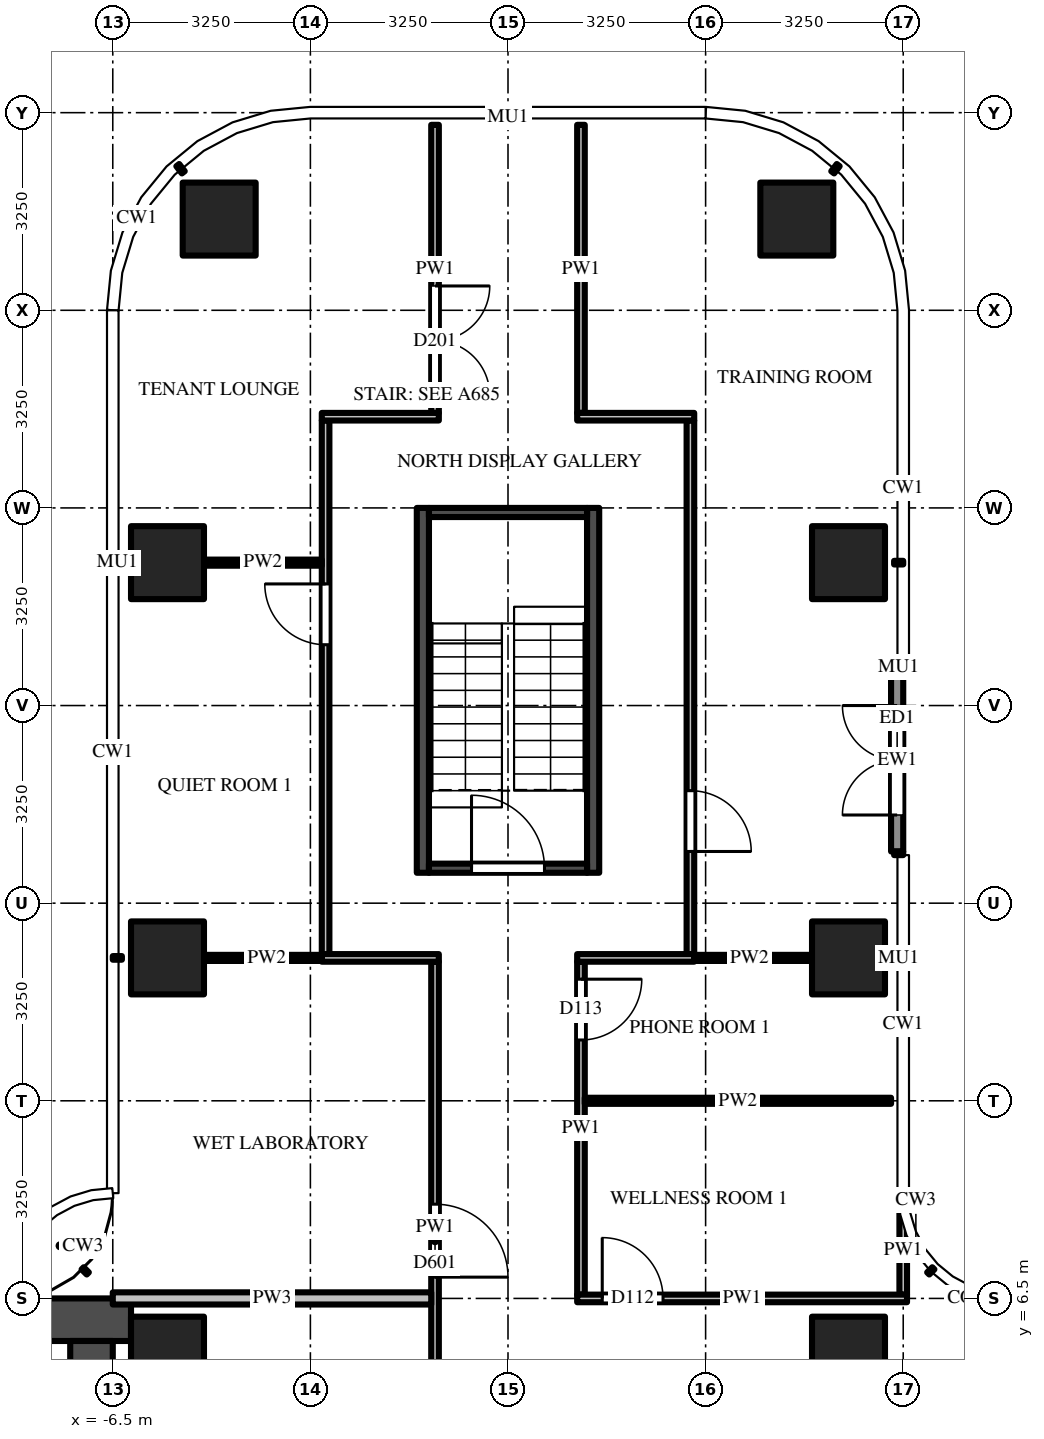
"""IFC4 building model, lengths in metres.
Left out: names, types, materials, properties, quantities, classifications, styles, units other than length and angle.
Written with IfcOpenShell. Run it as: python <this file> out.ifc"""

import sys

from ifc_helpers import new_model, si_unit, direction, frame, frame_2d, origin, origin_2d, place, context, subcontext, project, spatial, rectangle, extrude, source, transform, mapped, element, fill, save


model = new_model("IFC4")
c1 = context("Model", 3, precision=1e-05, world=origin(), true_north=direction((0.0, 1.0)))
c2 = subcontext(c1, "Body", "Model", "MODEL_VIEW")
j1 = project(units=[si_unit("LENGTHUNIT", "METRE"), si_unit("PLANEANGLEUNIT", "RADIAN")], contexts=[c1])
p1 = place(None, origin())
s1 = spatial("IfcSite", under=j1, at=p1, CompositionType="ELEMENT")
p2 = place(p1, origin())
s2 = spatial("IfcBuilding", under=s1, at=p2, CompositionType="ELEMENT")
p3 = place(p2, frame((0.0, 0.0, 173.7)))
s3 = spatial("IfcBuildingStorey", under=s2, at=p3, CompositionType="ELEMENT", Elevation=173.7)
m1 = source(origin(), c2, "Body", "SweptSolid", [
    extrude(rectangle(XDim=1.2, YDim=1.2, at=origin_2d()), origin(), (0.0, 0.0, 1.0), 3.9),
])
for number, where, z_axis, x_axis in (
    (1, (-5.6, 12.1, 0.0), (0.0, 0.0, 1.0), (1.0, 0.0, 0.0)),
    (2, (-5.6, 18.6, 0.0), (0.0, 0.0, 1.0), (1.0, 0.0, 0.0)),
    (3, (-4.75, 24.25, 0.0), (0.0, 0.0, 1.0), (1.0, 0.0, 0.0)),
    (4, (5.6, 12.1, 0.0), (0.0, 0.0, 1.0), (1.0, 0.0, 0.0)),
    (5, (5.6, 18.6, 0.0), (0.0, 0.0, 1.0), (1.0, 0.0, 0.0)),
    (6, (4.75, 24.25, 0.0), (0.0, 0.0, 1.0), (1.0, 0.0, 0.0)),
    (7, (5.6, 5.6, 0.0), (0.0, 0.0, 1.0), (1.0, 0.0, 0.0)),
    (8, (-5.6, 5.6, 0.0), (0.0, 0.0, 1.0), (1.0, 0.0, 0.0)),
):
    element("IfcColumn", number, at=place(p3, frame(where, z_axis=z_axis, x_axis=x_axis)), inside=s3, PredefinedType="COLUMN", context=c2, shape_type="MappedRepresentation", body=[
        mapped(m1, transform((0.0, 0.0, 0.0))),
    ])
m2 = source(origin(), c2, "Body", "SweptSolid", [
    extrude(rectangle(XDim=16.55, YDim=0.7, at=frame_2d((8.275, 0.0))), origin(), (0.0, 0.0, 1.0), 3.7),
])
p4 = place(p3, frame((-6.2, 6.15, 0.0), z_axis=(0.0, 0.0, 1.0), x_axis=(-1.0, 0.0, 0.0)))
e9 = element("IfcWall", 9, at=p4, inside=s3, PredefinedType="SHEAR", context=c2, shape_type="MappedRepresentation", body=[
    mapped(m2, transform((0.0, 0.0, 0.0))),
])
m3 = source(origin(), c2, "Body", "SweptSolid", [
    extrude(rectangle(XDim=9.05, YDim=0.7, at=frame_2d((4.525, 0.0))), origin(), (0.0, 0.0, 1.0), 3.7),
])
p5 = place(p3, frame((-6.85, 5.8, 0.0), z_axis=(0.0, 0.0, 1.0), x_axis=(0.0, -1.0, 0.0)))
e10 = element("IfcWall", 10, at=p5, inside=s3, PredefinedType="SHEAR", context=c2, shape_type="MappedRepresentation", body=[
    mapped(m3, transform((0.0, 0.0, 0.0))),
])
m4 = source(origin(), c2, "Body", "SweptSolid", [
    extrude(rectangle(XDim=1.8, YDim=2.1, at=frame_2d((0.9, 1.05))), frame((0.0, 0.36, 0.0), z_axis=(0.0, -1.0, 0.0), x_axis=(1.0, 0.0, 0.0)), (0.0, 0.0, 1.0), 0.72),
])
p6 = place(p5, frame((3.15, 0.0, 0.0)))
e11 = element("IfcOpeningElement", 11, at=p6, cuts=e10, PredefinedType="OPENING", context=c2, shape_type="MappedRepresentation", body=[
    mapped(m4, transform((0.0, 0.0, 0.0))),
])
m5 = source(origin(), c2, "Body", "SweptSolid", [
    extrude(rectangle(XDim=6.0, YDim=0.2, at=frame_2d((3.0, 0.0))), origin(), (0.0, 0.0, 1.0), 3.7),
])
for number, where, z_axis, x_axis in (
    (12, (-1.4, 13.5, 0.0), (0.0, 0.0, 1.0), (0.0, 1.0, 0.0)),
    (13, (1.4, 13.5, 0.0), (0.0, 0.0, 1.0), (0.0, 1.0, 0.0)),
):
    element("IfcWall", number, at=place(p3, frame(where, z_axis=z_axis, x_axis=x_axis)), inside=s3, PredefinedType="SHEAR", context=c2, shape_type="MappedRepresentation", body=[
        mapped(m5, transform((0.0, 0.0, 0.0))),
    ])
m6 = source(origin(), c2, "Body", "SweptSolid", [
    extrude(rectangle(XDim=2.6, YDim=0.15, at=frame_2d((1.3, 0.0))), origin(), (0.0, 0.0, 1.0), 3.7),
])
p7 = place(p3, frame((-1.3, 13.575, 0.0), z_axis=(0.0, 0.0, 1.0), x_axis=(1.0, 0.0, 0.0)))
e14 = element("IfcWall", 14, at=p7, inside=s3, PredefinedType="SHEAR", context=c2, shape_type="MappedRepresentation", body=[
    mapped(m6, transform((0.0, 0.0, 0.0))),
])
m7 = source(origin(), c2, "Body", "SweptSolid", [
    extrude(rectangle(XDim=1.2, YDim=2.1, at=frame_2d((0.6, 1.05))), frame((0.0, 0.085, 0.0), z_axis=(0.0, -1.0, 0.0), x_axis=(1.0, 0.0, 0.0)), (0.0, 0.0, 1.0), 0.17),
])
p8 = place(p7, frame((0.7, 0.0, 0.0)))
e15 = element("IfcOpeningElement", 15, at=p8, cuts=e14, PredefinedType="OPENING", context=c2, shape_type="MappedRepresentation", body=[
    mapped(m7, transform((0.0, 0.0, 0.0))),
])
p9 = place(p3, frame((-1.3, 19.425, 0.0), z_axis=(0.0, 0.0, 1.0), x_axis=(1.0, 0.0, 0.0)))
e16 = element("IfcWall", 16, at=p9, inside=s3, PredefinedType="SHEAR", context=c2, shape_type="MappedRepresentation", body=[
    mapped(m6, transform((0.0, 0.0, 0.0))),
])
m8 = source(origin(), c2, "Body", "SweptSolid", [
    extrude(rectangle(XDim=3.0, YDim=0.2, at=frame_2d((1.5, 0.0))), origin(), (0.0, 0.0, 1.0), 3.7),
])
p10 = place(p3, frame((6.4, 13.85, 0.0), z_axis=(0.0, 0.0, 1.0), x_axis=(0.0, 1.0, 0.0)))
e17 = element("IfcWall", 17, at=p10, inside=s3, PredefinedType="SOLIDWALL", context=c2, shape_type="MappedRepresentation", body=[
    mapped(m8, transform((0.0, 0.0, 0.0))),
])
m9 = source(origin(), c2, "Body", "SweptSolid", [
    extrude(rectangle(XDim=1.8, YDim=2.4, at=frame_2d((0.9, 1.2))), frame((0.0, 0.11, 0.0), z_axis=(0.0, -1.0, 0.0), x_axis=(1.0, 0.0, 0.0)), (0.0, 0.0, 1.0), 0.22),
])
p11 = place(p10, frame((0.6, 0.0, 0.0)))
e18 = element("IfcOpeningElement", 18, at=p11, cuts=e17, PredefinedType="OPENING", context=c2, shape_type="MappedRepresentation", body=[
    mapped(m9, transform((0.0, 0.0, 0.0))),
])
m10 = source(origin(), c2, "Body", "SweptSolid", [
    extrude(rectangle(XDim=8.788, YDim=0.125, at=frame_2d((4.394, 0.0))), origin(), (0.0, 0.0, 1.0), 2.997),
])
p12 = place(p3, frame((-3.0, 12.15, 0.0), z_axis=(0.0, 0.0, 1.0), x_axis=(0.0, 1.0, 0.0)))
e19 = element("IfcWall", 19, at=p12, inside=s3, PredefinedType="PARTITIONING", context=c2, shape_type="MappedRepresentation", body=[
    mapped(m10, transform((0.0, 0.0, 0.0))),
])
m11 = source(origin(), c2, "Body", "SweptSolid", [
    extrude(rectangle(XDim=1.0, YDim=2.1, at=frame_2d((0.5, 1.05))), frame((0.0, 0.073, 0.0), z_axis=(0.0, -1.0, 0.0), x_axis=(1.0, 0.0, 0.0)), (0.0, 0.0, 1.0), 0.145),
])
p13 = place(p12, frame((5.1, 0.0, 0.0)))
e20 = element("IfcOpeningElement", 20, at=p13, cuts=e19, PredefinedType="OPENING", context=c2, shape_type="MappedRepresentation", body=[
    mapped(m11, transform((0.0, 0.0, 0.0))),
])
m12 = source(origin(), c2, "Body", "SweptSolid", [
    extrude(rectangle(XDim=8.725, YDim=0.125, at=frame_2d((4.363, 0.0))), origin(), (0.0, 0.0, 1.0), 2.997),
])
p14 = place(p3, frame((-1.2, 12.038, 0.0), z_axis=(0.0, 0.0, 1.0), x_axis=(0.0, -1.0, 0.0)))
e21 = element("IfcWall", 21, at=p14, inside=s3, PredefinedType="PARTITIONING", context=c2, shape_type="MappedRepresentation", body=[
    mapped(m12, transform((0.0, 0.0, 0.0))),
])
m13 = source(origin(), c2, "Body", "SweptSolid", [
    extrude(rectangle(XDim=1.2, YDim=2.1, at=frame_2d((0.6, 1.05))), frame((0.0, 0.073, 0.0), z_axis=(0.0, -1.0, 0.0), x_axis=(1.0, 0.0, 0.0)), (0.0, 0.0, 1.0), 0.145),
])
p15 = place(p14, frame((3.988, 0.0, 0.0)))
e22 = element("IfcOpeningElement", 22, at=p15, cuts=e21, PredefinedType="OPENING", context=c2, shape_type="MappedRepresentation", body=[
    mapped(m13, transform((0.0, 0.0, 0.0))),
])
m14 = source(origin(), c2, "Body", "SweptSolid", [
    extrude(rectangle(XDim=4.738, YDim=0.125, at=frame_2d((2.369, 0.0))), origin(), (0.0, 0.0, 1.0), 2.78),
])
p16 = place(p3, frame((-1.2, 25.8, 0.0), z_axis=(0.0, 0.0, 1.0), x_axis=(0.0, -1.0, 0.0)))
e23 = element("IfcWall", 23, at=p16, inside=s3, PredefinedType="PARTITIONING", context=c2, shape_type="MappedRepresentation", body=[
    mapped(m14, transform((0.0, 0.0, 0.0))),
])
m15 = source(origin(), c2, "Body", "SweptSolid", [
    extrude(rectangle(XDim=1.8, YDim=2.1, at=frame_2d((0.9, 1.05))), frame((0.0, 0.073, 0.0), z_axis=(0.0, -1.0, 0.0), x_axis=(1.0, 0.0, 0.0)), (0.0, 0.0, 1.0), 0.145),
])
p17 = place(p16, frame((2.65, 0.0, 0.0)))
e24 = element("IfcOpeningElement", 24, at=p17, cuts=e23, PredefinedType="OPENING", context=c2, shape_type="MappedRepresentation", body=[
    mapped(m15, transform((0.0, 0.0, 0.0))),
])
m16 = source(origin(), c2, "Body", "SweptSolid", [
    extrude(rectangle(XDim=5.475, YDim=0.125, at=frame_2d((2.738, 0.0))), origin(), (0.0, 0.0, 1.0), 2.997),
])
p18 = place(p3, frame((1.2, 12.038, 0.0), z_axis=(0.0, 0.0, 1.0), x_axis=(0.0, -1.0, 0.0)))
e25 = element("IfcWall", 25, at=p18, inside=s3, PredefinedType="PARTITIONING", context=c2, shape_type="MappedRepresentation", body=[
    mapped(m16, transform((0.0, 0.0, 0.0))),
])
p19 = place(p18, frame((0.288, 0.0, 0.0)))
e26 = element("IfcOpeningElement", 26, at=p19, cuts=e25, PredefinedType="OPENING", context=c2, shape_type="MappedRepresentation", body=[
    mapped(m11, transform((0.0, 0.0, 0.0))),
])
p20 = place(p3, frame((1.2, 25.8, 0.0), z_axis=(0.0, 0.0, 1.0), x_axis=(0.0, -1.0, 0.0)))
e27 = element("IfcWall", 27, at=p20, inside=s3, PredefinedType="PARTITIONING", context=c2, shape_type="MappedRepresentation", body=[
    mapped(m14, transform((0.0, 0.0, 0.0))),
])
p21 = place(p3, frame((3.0, 20.938, 0.0), z_axis=(0.0, 0.0, 1.0), x_axis=(0.0, -1.0, 0.0)))
e28 = element("IfcWall", 28, at=p21, inside=s3, PredefinedType="PARTITIONING", context=c2, shape_type="MappedRepresentation", body=[
    mapped(m10, transform((0.0, 0.0, 0.0))),
])
p22 = place(p21, frame((6.087, 0.0, 0.0)))
e29 = element("IfcOpeningElement", 29, at=p22, cuts=e28, PredefinedType="OPENING", context=c2, shape_type="MappedRepresentation", body=[
    mapped(m11, transform((0.0, 0.0, 0.0))),
])
m17 = source(origin(), c2, "Body", "SweptSolid", [
    extrude(rectangle(XDim=1.469, YDim=0.125, at=frame_2d((0.734, 0.0))), origin(), (0.0, 0.0, 1.0), 3.7),
])
p23 = place(p3, frame((6.5, 6.562, 0.0), z_axis=(0.0, 0.0, 1.0), x_axis=(0.0, 1.0, 0.0)))
e30 = element("IfcWall", 30, at=p23, inside=s3, PredefinedType="PARTITIONING", context=c2, shape_type="MappedRepresentation", body=[
    mapped(m17, transform((0.0, 0.0, 0.0))),
])
m18 = source(origin(), c2, "Body", "SweptSolid", [
    extrude(rectangle(XDim=5.238, YDim=0.2, at=frame_2d((2.619, 0.0))), origin(), (0.0, 0.0, 1.0), 2.78),
])
p24 = place(p3, frame((-6.5, 6.5, 0.0), z_axis=(0.0, 0.0, 1.0), x_axis=(1.0, 0.0, 0.0)))
e31 = element("IfcWall", 31, at=p24, inside=s3, PredefinedType="PARTITIONING", context=c2, shape_type="MappedRepresentation", body=[
    mapped(m18, transform((0.0, 0.0, 0.0))),
])
m19 = source(origin(), c2, "Body", "SweptSolid", [
    extrude(rectangle(XDim=5.425, YDim=0.125, at=frame_2d((2.712, 0.0))), origin(), (0.0, 0.0, 1.0), 2.78),
])
p25 = place(p3, frame((1.137, 6.5, 0.0), z_axis=(0.0, 0.0, 1.0), x_axis=(1.0, 0.0, 0.0)))
e32 = element("IfcWall", 32, at=p25, inside=s3, PredefinedType="PARTITIONING", context=c2, shape_type="MappedRepresentation", body=[
    mapped(m19, transform((0.0, 0.0, 0.0))),
])
p26 = place(p25, frame((0.413, 0.0, 0.0)))
e33 = element("IfcOpeningElement", 33, at=p26, cuts=e32, PredefinedType="OPENING", context=c2, shape_type="MappedRepresentation", body=[
    mapped(m11, transform((0.0, 0.0, 0.0))),
])
m20 = source(origin(), c2, "Body", "SweptSolid", [
    extrude(rectangle(XDim=5.038, YDim=0.1, at=frame_2d((2.519, 0.0))), origin(), (0.0, 0.0, 1.0), 2.78),
])
p27 = place(p3, frame((1.262, 9.75, 0.0), z_axis=(0.0, 0.0, 1.0), x_axis=(1.0, 0.0, 0.0)))
e34 = element("IfcWall", 34, at=p27, inside=s3, PredefinedType="PARTITIONING", context=c2, shape_type="MappedRepresentation", body=[
    mapped(m20, transform((0.0, 0.0, 0.0))),
])
m21 = source(origin(), c2, "Body", "SweptSolid", [
    extrude(rectangle(XDim=2.062, YDim=0.1, at=frame_2d((1.031, 0.0))), origin(), (0.0, 0.0, 1.0), 2.997),
])
for number, where, z_axis, x_axis in (
    (35, (-5.0, 12.1, 0.0), (0.0, 0.0, 1.0), (1.0, 0.0, 0.0)),
    (36, (2.938, 12.1, 0.0), (0.0, 0.0, 1.0), (1.0, 0.0, 0.0)),
):
    element("IfcWall", number, at=place(p3, frame(where, z_axis=z_axis, x_axis=x_axis)), inside=s3, PredefinedType="PARTITIONING", context=c2, shape_type="MappedRepresentation", body=[
        mapped(m21, transform((0.0, 0.0, 0.0))),
    ])
m22 = source(origin(), c2, "Body", "SweptSolid", [
    extrude(rectangle(XDim=1.925, YDim=0.125, at=frame_2d((0.962, 0.0))), origin(), (0.0, 0.0, 1.0), 2.997),
])
for number, where, z_axis, x_axis in (
    (37, (-1.137, 12.1, 0.0), (0.0, 0.0, 1.0), (-1.0, 0.0, 0.0)),
    (38, (3.062, 12.1, 0.0), (0.0, 0.0, 1.0), (-1.0, 0.0, 0.0)),
):
    element("IfcWall", number, at=place(p3, frame(where, z_axis=z_axis, x_axis=x_axis)), inside=s3, PredefinedType="PARTITIONING", context=c2, shape_type="MappedRepresentation", body=[
        mapped(m22, transform((0.0, 0.0, 0.0))),
    ])
m23 = source(origin(), c2, "Body", "SweptSolid", [
    extrude(rectangle(XDim=1.938, YDim=0.1, at=frame_2d((0.969, 0.0))), origin(), (0.0, 0.0, 1.0), 3.223),
])
p28 = place(p3, frame((-5.0, 18.6, 0.0), z_axis=(0.0, 0.0, 1.0), x_axis=(1.0, 0.0, 0.0)))
e39 = element("IfcWall", 39, at=p28, inside=s3, PredefinedType="PARTITIONING", context=c2, shape_type="MappedRepresentation", body=[
    mapped(m23, transform((0.0, 0.0, 0.0))),
])
m24 = source(origin(), c2, "Body", "SweptSolid", [
    extrude(rectangle(XDim=1.925, YDim=0.125, at=frame_2d((0.962, 0.0))), origin(), (0.0, 0.0, 1.0), 3.7),
])
for number, where, z_axis, x_axis in (
    (40, (-3.062, 21.0, 0.0), (0.0, 0.0, 1.0), (1.0, 0.0, 0.0)),
    (41, (1.137, 21.0, 0.0), (0.0, 0.0, 1.0), (1.0, 0.0, 0.0)),
):
    element("IfcWall", number, at=place(p3, frame(where, z_axis=z_axis, x_axis=x_axis)), inside=s3, PredefinedType="PARTITIONING", context=c2, shape_type="MappedRepresentation", body=[
        mapped(m24, transform((0.0, 0.0, 0.0))),
    ])
m25 = source(origin(), c2, "Body", "SweptSolid", [
    extrude(rectangle(XDim=1.2, YDim=2.1, at=frame_2d((0.6, 1.05))), frame((0.0, 0.025, 0.0), z_axis=(0.0, -1.0, 0.0), x_axis=(1.0, 0.0, 0.0)), (0.0, 0.0, 1.0), 0.05),
])
p29 = place(p8, origin())
e42 = element("IfcDoor", 42, at=p29, inside=s3, OperationType="SINGLE_SWING_LEFT", PredefinedType="DOOR", context=c2, shape_type="MappedRepresentation", body=[
    mapped(m25, transform((0.0, 0.0, 0.0))),
])
fill(e15, e42)
m26 = source(origin(), c2, "Body", "SweptSolid", [
    extrude(rectangle(XDim=1.8, YDim=2.4, at=frame_2d((0.9, 1.2))), frame((0.0, 0.025, 0.0), z_axis=(0.0, -1.0, 0.0), x_axis=(1.0, 0.0, 0.0)), (0.0, 0.0, 1.0), 0.05),
])
p30 = place(p11, origin())
e43 = element("IfcDoor", 43, at=p30, inside=s3, OperationType="DOUBLE_DOOR_SINGLE_SWING", PredefinedType="DOOR", context=c2, shape_type="MappedRepresentation", body=[
    mapped(m26, transform((0.0, 0.0, 0.0))),
])
fill(e18, e43)
m27 = source(origin(), c2, "Body", "SweptSolid", [
    extrude(rectangle(XDim=1.0, YDim=2.1, at=frame_2d((0.5, 1.05))), frame((0.0, 0.025, 0.0), z_axis=(0.0, -1.0, 0.0), x_axis=(1.0, 0.0, 0.0)), (0.0, 0.0, 1.0), 0.05),
])
p31 = place(p26, origin())
e44 = element("IfcDoor", 44, at=p31, inside=s3, OperationType="SINGLE_SWING_LEFT", PredefinedType="DOOR", context=c2, shape_type="MappedRepresentation", body=[
    mapped(m27, transform((0.0, 0.0, 0.0))),
])
fill(e33, e44)
p32 = place(p15, origin())
e45 = element("IfcDoor", 45, at=p32, inside=s3, OperationType="SINGLE_SWING_RIGHT", PredefinedType="DOOR", context=c2, shape_type="MappedRepresentation", body=[
    mapped(m25, transform((0.0, 0.0, 0.0))),
])
fill(e22, e45)
p33 = place(p19, origin())
e46 = element("IfcDoor", 46, at=p33, inside=s3, OperationType="SINGLE_SWING_LEFT", PredefinedType="DOOR", context=c2, shape_type="MappedRepresentation", body=[
    mapped(m27, transform((0.0, 0.0, 0.0))),
])
fill(e26, e46)
p34 = place(p22, origin())
e47 = element("IfcDoor", 47, at=p34, inside=s3, OperationType="SINGLE_SWING_RIGHT", PredefinedType="DOOR", context=c2, shape_type="MappedRepresentation", body=[
    mapped(m27, transform((0.0, 0.0, 0.0))),
])
fill(e29, e47)
p35 = place(p13, origin())
e48 = element("IfcDoor", 48, at=p35, inside=s3, OperationType="SINGLE_SWING_RIGHT", PredefinedType="DOOR", context=c2, shape_type="MappedRepresentation", body=[
    mapped(m27, transform((0.0, 0.0, 0.0))),
])
fill(e20, e48)
m28 = source(origin(), c2, "Body", "SweptSolid", [
    extrude(rectangle(XDim=1.8, YDim=2.1, at=frame_2d((0.9, 1.05))), frame((0.0, 0.025, 0.0), z_axis=(0.0, -1.0, 0.0), x_axis=(1.0, 0.0, 0.0)), (0.0, 0.0, 1.0), 0.05),
])
p36 = place(p17, origin())
e49 = element("IfcDoor", 49, at=p36, inside=s3, OperationType="DOUBLE_DOOR_SINGLE_SWING", PredefinedType="DOOR", context=c2, shape_type="MappedRepresentation", body=[
    mapped(m28, transform((0.0, 0.0, 0.0))),
])
fill(e24, e49)
save(model, sys.argv[1])
